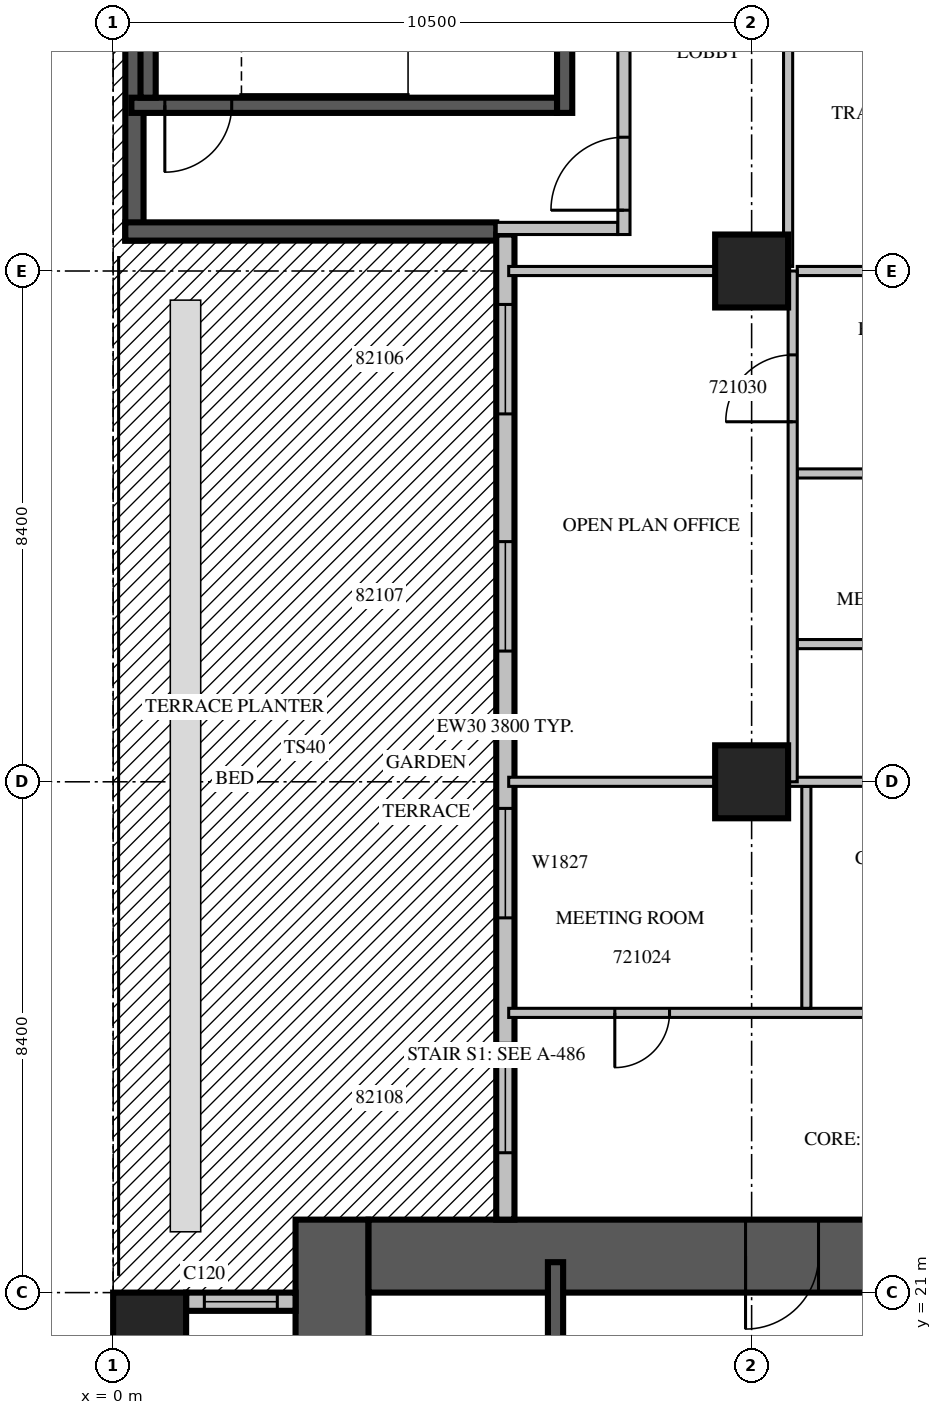
"""IFC4 building model, lengths in metres.
Left out: names, types, materials, properties, quantities, classifications, styles, units other than length and angle.
Written with IfcOpenShell. Run it as: python <this file> out.ifc"""

import sys

from ifc_helpers import new_model, si_unit, direction, frame, frame_2d, origin, origin_2d, place, context, subcontext, project, spatial, rectangle, extrude, source, transform, mapped, element, fill, save


model = new_model("IFC4")
c1 = context("Model", 3, precision=1e-05, world=origin(), true_north=direction((0.0, 1.0)))
c2 = subcontext(c1, "Body", "Model", "MODEL_VIEW")
j1 = project(units=[si_unit("LENGTHUNIT", "METRE"), si_unit("PLANEANGLEUNIT", "RADIAN")], contexts=[c1])
p1 = place(None, origin())
s1 = spatial("IfcSite", under=j1, at=p1, CompositionType="ELEMENT")
p2 = place(p1, origin())
s2 = spatial("IfcBuilding", under=s1, at=p2, CompositionType="ELEMENT")
p3 = place(p2, frame((0.0, 0.0, 99.3)))
s3 = spatial("IfcBuildingStorey", under=s2, at=p3, CompositionType="ELEMENT", Elevation=99.3)
m1 = source(origin(), c2, "Body", "SweptSolid", [
    extrude(rectangle(XDim=1.2, YDim=1.2, at=origin_2d()), origin(), (0.0, 0.0, 1.0), 4.2),
])
for number, where, z_axis, x_axis in (
    (1, (0.6, 20.4, 0.0), (0.0, 0.0, 1.0), (1.0, 0.0, 0.0)),
    (2, (10.5, 29.4, 0.0), (0.0, 0.0, 1.0), (1.0, 0.0, 0.0)),
    (3, (10.5, 37.8, 0.0), (0.0, 0.0, 1.0), (1.0, 0.0, 0.0)),
):
    element("IfcColumn", number, at=place(p3, frame(where, z_axis=z_axis, x_axis=x_axis)), inside=s3, PredefinedType="COLUMN", context=c2, shape_type="MappedRepresentation", body=[
        mapped(m1, transform((0.0, 0.0, 0.0), scale=1.0)),
    ])
m2 = source(origin(), c2, "Body", "SweptSolid", [
    extrude(rectangle(XDim=18.0, YDim=1.2, at=frame_2d((9.0, 0.0))), origin(), (0.0, 0.0, 1.0), 4.2),
])
p4 = place(p3, frame((3.6, 4.2, 0.0), z_axis=(0.0, 0.0, 1.0), x_axis=(0.0, 1.0, 0.0)))
e4 = element("IfcWall", 4, at=p4, inside=s3, PredefinedType="SHEAR", context=c2, shape_type="MappedRepresentation", body=[
    mapped(m2, transform((0.0, 0.0, 0.0), scale=1.0)),
])
m3 = source(origin(), c2, "Body", "SweptSolid", [
    extrude(rectangle(XDim=2.2, YDim=2.1, at=frame_2d((1.1, 1.05))), frame((0.0, 0.61, 0.0), z_axis=(0.0, -1.0, 0.0), x_axis=(1.0, 0.0, 0.0)), (0.0, 0.0, 1.0), 1.22),
])
p5 = place(p4, frame((4.2, 0.0, 0.0)))
e5 = element("IfcOpeningElement", 5, at=p5, cuts=e4, PredefinedType="OPENING", context=c2, shape_type="MappedRepresentation", body=[
    mapped(m3, transform((0.0, 0.0, 0.0), scale=1.0)),
])
p6 = place(p4, frame((10.95, 0.0, 0.0)))
e6 = element("IfcOpeningElement", 6, at=p6, cuts=e4, PredefinedType="OPENING", context=c2, shape_type="SweptSolid", body=[
    extrude(rectangle(XDim=0.9, YDim=2.1, at=frame_2d((0.45, 1.05))), frame((0.0, 0.61, 0.0), z_axis=(0.0, -1.0, 0.0), x_axis=(1.0, 0.0, 0.0)), (0.0, 0.0, 1.0), 1.22),
])
m4 = source(origin(), c2, "Body", "SweptSolid", [
    extrude(rectangle(XDim=16.8, YDim=1.2, at=frame_2d((8.4, 0.0))), origin(), (0.0, 0.0, 1.0), 4.2),
])
p7 = place(p3, frame((4.2, 21.6, 0.0), z_axis=(0.0, 0.0, 1.0), x_axis=(1.0, 0.0, 0.0)))
e7 = element("IfcWall", 7, at=p7, inside=s3, PredefinedType="SHEAR", context=c2, shape_type="MappedRepresentation", body=[
    mapped(m4, transform((0.0, 0.0, 0.0), scale=1.0)),
])
m5 = source(origin(), c2, "Body", "SweptSolid", [
    extrude(rectangle(XDim=1.2, YDim=2.1, at=frame_2d((0.6, 1.05))), frame((0.0, 0.61, 0.0), z_axis=(0.0, -1.0, 0.0), x_axis=(1.0, 0.0, 0.0)), (0.0, 0.0, 1.0), 1.22),
])
p8 = place(p7, frame((6.2, 0.0, 0.0)))
e8 = element("IfcOpeningElement", 8, at=p8, cuts=e7, PredefinedType="OPENING", context=c2, shape_type="MappedRepresentation", body=[
    mapped(m5, transform((0.0, 0.0, 0.0), scale=1.0)),
])
p9 = place(p3, frame((0.35, 43.95, 0.0), z_axis=(0.0, 0.0, 1.0), x_axis=(0.0, -1.0, 0.0)))
e9 = element("IfcWall", 9, at=p9, inside=s3, PredefinedType="SOLIDWALL", context=c2, shape_type="SweptSolid", body=[
    extrude(rectangle(XDim=5.65, YDim=0.3, at=frame_2d((2.825, 0.0))), origin(), (0.0, 0.0, 1.0), 3.8),
])
m6 = source(origin(), c2, "Body", "SweptSolid", [
    extrude(rectangle(XDim=6.1, YDim=0.3, at=frame_2d((3.05, 0.0))), origin(), (0.0, 0.0, 1.0), 3.8),
])
p10 = place(p3, frame((0.2, 38.45, 0.0), z_axis=(0.0, 0.0, 1.0), x_axis=(1.0, 0.0, 0.0)))
e10 = element("IfcWall", 10, at=p10, inside=s3, PredefinedType="SOLIDWALL", context=c2, shape_type="MappedRepresentation", body=[
    mapped(m6, transform((0.0, 0.0, 0.0), scale=1.0)),
])
p11 = place(p3, frame((6.45, 38.4, 0.0), z_axis=(0.0, 0.0, 1.0), x_axis=(0.0, -1.0, 0.0)))
e11 = element("IfcWall", 11, at=p11, inside=s3, PredefinedType="STANDARD", context=c2, shape_type="SweptSolid", body=[
    extrude(rectangle(XDim=16.2, YDim=0.3, at=frame_2d((8.1, 0.0))), origin(), (0.0, 0.0, 1.0), 3.8),
])
m7 = source(origin(), c2, "Body", "SweptSolid", [
    extrude(rectangle(XDim=1.8, YDim=2.4, at=frame_2d((0.9, 1.2))), frame((0.0, 0.16, 0.0), z_axis=(0.0, -1.0, 0.0), x_axis=(1.0, 0.0, 0.0)), (0.0, 0.0, 1.0), 0.32),
])
p12 = place(p11, frame((1.15, 0.0, 0.0)))
e12 = element("IfcOpeningElement", 12, at=p12, cuts=e11, PredefinedType="OPENING", context=c2, shape_type="MappedRepresentation", body=[
    mapped(m7, transform((0.0, 0.0, 0.0), scale=1.0)),
])
p13 = place(p11, frame((5.05, 0.0, 0.0)))
e13 = element("IfcOpeningElement", 13, at=p13, cuts=e11, PredefinedType="OPENING", context=c2, shape_type="MappedRepresentation", body=[
    mapped(m7, transform((0.0, 0.0, 0.0), scale=1.0)),
])
m8 = source(origin(), c2, "Body", "SweptSolid", [
    extrude(rectangle(XDim=1.8, YDim=2.7, at=frame_2d((0.9, 1.35))), frame((0.0, 0.16, 0.0), z_axis=(0.0, -1.0, 0.0), x_axis=(1.0, 0.0, 0.0)), (0.0, 0.0, 1.0), 0.32),
])
p14 = place(p11, frame((9.438, 0.0, 0.6)))
e14 = element("IfcOpeningElement", 14, at=p14, cuts=e11, PredefinedType="OPENING", context=c2, shape_type="MappedRepresentation", body=[
    mapped(m8, transform((0.0, 0.0, 0.0), scale=1.0)),
])
p15 = place(p11, frame((13.3, 0.0, 0.0)))
e15 = element("IfcOpeningElement", 15, at=p15, cuts=e11, PredefinedType="OPENING", context=c2, shape_type="MappedRepresentation", body=[
    mapped(m7, transform((0.0, 0.0, 0.0), scale=1.0)),
])
m9 = source(origin(), c2, "Body", "SweptSolid", [
    extrude(rectangle(XDim=1.8, YDim=0.3, at=frame_2d((0.9, 0.0))), origin(), (0.0, 0.0, 1.0), 3.8),
])
p16 = place(p3, frame((3.0, 20.85, 0.0), z_axis=(0.0, 0.0, 1.0), x_axis=(-1.0, 0.0, 0.0)))
e16 = element("IfcWall", 16, at=p16, inside=s3, PredefinedType="STANDARD", context=c2, shape_type="MappedRepresentation", body=[
    mapped(m9, transform((0.0, 0.0, 0.0), scale=1.0)),
])
m10 = source(origin(), c2, "Body", "SweptSolid", [
    extrude(rectangle(XDim=1.2, YDim=2.7, at=frame_2d((0.6, 1.35))), frame((0.0, 0.16, 0.0), z_axis=(0.0, -1.0, 0.0), x_axis=(1.0, 0.0, 0.0)), (0.0, 0.0, 1.0), 0.32),
])
p17 = place(p16, frame((0.3, 0.0, 0.6)))
e17 = element("IfcOpeningElement", 17, at=p17, cuts=e16, PredefinedType="OPENING", context=c2, shape_type="MappedRepresentation", body=[
    mapped(m10, transform((0.0, 0.0, 0.0), scale=1.0)),
])
m11 = source(origin(), c2, "Body", "SweptSolid", [
    extrude(rectangle(XDim=6.6, YDim=0.25, at=frame_2d((3.3, 0.0))), origin(), (0.0, 0.0, 1.0), 3.8),
])
p18 = place(p3, frame((7.275, 14.9, 0.0), z_axis=(0.0, 0.0, 1.0), x_axis=(0.0, 1.0, 0.0)))
e18 = element("IfcWall", 18, at=p18, inside=s3, PredefinedType="SOLIDWALL", context=c2, shape_type="MappedRepresentation", body=[
    mapped(m11, transform((0.0, 0.0, 0.0), scale=1.0)),
])
m12 = source(origin(), c2, "Body", "SweptSolid", [
    extrude(rectangle(XDim=1.1, YDim=2.1, at=frame_2d((0.55, 1.05))), frame((0.0, 0.135, 0.0), z_axis=(0.0, -1.0, 0.0), x_axis=(1.0, 0.0, 0.0)), (0.0, 0.0, 1.0), 0.27),
])
p19 = place(p18, frame((0.15, 0.0, 0.0)))
e19 = element("IfcOpeningElement", 19, at=p19, cuts=e18, PredefinedType="OPENING", context=c2, shape_type="MappedRepresentation", body=[
    mapped(m12, transform((0.0, 0.0, 0.0), scale=1.0)),
])
m13 = source(origin(), c2, "Body", "SweptSolid", [
    extrude(rectangle(XDim=7.0, YDim=0.25, at=frame_2d((3.5, 0.0))), origin(), (0.0, 0.0, 1.0), 3.8),
])
p20 = place(p3, frame((0.3, 40.525, 0.0), z_axis=(0.0, 0.0, 1.0), x_axis=(1.0, 0.0, 0.0)))
e20 = element("IfcWall", 20, at=p20, inside=s3, PredefinedType="SOLIDWALL", context=c2, shape_type="MappedRepresentation", body=[
    mapped(m13, transform((0.0, 0.0, 0.0), scale=1.0)),
])
p21 = place(p20, frame((0.55, 0.0, 0.0)))
e21 = element("IfcOpeningElement", 21, at=p21, cuts=e20, PredefinedType="OPENING", context=c2, shape_type="MappedRepresentation", body=[
    mapped(m12, transform((0.0, 0.0, 0.0), scale=1.0)),
])
m14 = source(origin(), c2, "Body", "SweptSolid", [
    extrude(rectangle(XDim=3.45, YDim=0.25, at=frame_2d((1.725, 0.0))), origin(), (0.0, 0.0, 1.0), 3.8),
])
p22 = place(p3, frame((7.425, 40.4, 0.0), z_axis=(0.0, 0.0, 1.0), x_axis=(0.0, 1.0, 0.0)))
e22 = element("IfcWall", 22, at=p22, inside=s3, PredefinedType="SOLIDWALL", context=c2, shape_type="MappedRepresentation", body=[
    mapped(m14, transform((0.0, 0.0, 0.0), scale=1.0)),
])
m15 = source(origin(), c2, "Body", "SweptSolid", [
    extrude(rectangle(XDim=2.95, YDim=0.25, at=frame_2d((1.475, 0.0))), origin(), (0.0, 0.0, 1.0), 3.8),
])
p23 = place(p3, frame((0.575, 40.65, 0.0), z_axis=(0.0, 0.0, 1.0), x_axis=(0.0, 1.0, 0.0)))
e23 = element("IfcWall", 23, at=p23, inside=s3, PredefinedType="SOLIDWALL", context=c2, shape_type="MappedRepresentation", body=[
    mapped(m15, transform((0.0, 0.0, 0.0), scale=1.0)),
])
p24 = place(p3, frame((6.3, 38.5, 0.0), z_axis=(0.0, 0.0, 1.0), x_axis=(1.0, 0.0, 0.0)))
e24 = element("IfcWall", 24, at=p24, inside=s3, PredefinedType="PARTITIONING", context=c2, shape_type="SweptSolid", body=[
    extrude(rectangle(XDim=2.0, YDim=0.2, at=frame_2d((1.0, 0.0))), origin(), (0.0, 0.0, 1.0), 3.8),
])
m16 = source(origin(), c2, "Body", "SweptSolid", [
    extrude(rectangle(XDim=5.45, YDim=0.2, at=frame_2d((2.725, 0.0))), origin(), (0.0, 0.0, 1.0), 3.8),
])
p25 = place(p3, frame((8.4, 38.4, 0.0), z_axis=(0.0, 0.0, 1.0), x_axis=(0.0, 1.0, 0.0)))
e25 = element("IfcWall", 25, at=p25, inside=s3, PredefinedType="PARTITIONING", context=c2, shape_type="MappedRepresentation", body=[
    mapped(m16, transform((0.0, 0.0, 0.0), scale=1.0)),
])
m17 = source(origin(), c2, "Body", "SweptSolid", [
    extrude(rectangle(XDim=1.2, YDim=2.1, at=frame_2d((0.6, 1.05))), frame((0.0, 0.11, 0.0), z_axis=(0.0, -1.0, 0.0), x_axis=(1.0, 0.0, 0.0)), (0.0, 0.0, 1.0), 0.22),
])
p26 = place(p25, frame((0.4, 0.0, 0.0)))
e26 = element("IfcOpeningElement", 26, at=p26, cuts=e25, PredefinedType="OPENING", context=c2, shape_type="MappedRepresentation", body=[
    mapped(m17, transform((0.0, 0.0, 0.0), scale=1.0)),
])
m18 = source(origin(), c2, "Body", "SweptSolid", [
    extrude(rectangle(XDim=0.9, YDim=2.1, at=frame_2d((0.45, 1.05))), frame((0.0, 0.11, 0.0), z_axis=(0.0, -1.0, 0.0), x_axis=(1.0, 0.0, 0.0)), (0.0, 0.0, 1.0), 0.22),
])
p27 = place(p25, frame((3.25, 0.0, 0.0)))
e27 = element("IfcOpeningElement", 27, at=p27, cuts=e25, PredefinedType="OPENING", context=c2, shape_type="MappedRepresentation", body=[
    mapped(m18, transform((0.0, 0.0, 0.0), scale=1.0)),
])
p28 = place(p3, frame((6.505, 25.6, 0.0), z_axis=(0.0, 0.0, 1.0), x_axis=(1.0, 0.0, 0.0)))
e28 = element("IfcWall", 28, at=p28, inside=s3, PredefinedType="PARTITIONING", context=c2, shape_type="SweptSolid", body=[
    extrude(rectangle(XDim=8.495, YDim=0.15, at=frame_2d((4.247, 0.0))), origin(), (0.0, 0.0, 1.0), 3.8),
])
m19 = source(origin(), c2, "Body", "SweptSolid", [
    extrude(rectangle(XDim=0.9, YDim=2.1, at=frame_2d((0.45, 1.05))), frame((0.0, 0.085, 0.0), z_axis=(0.0, -1.0, 0.0), x_axis=(1.0, 0.0, 0.0)), (0.0, 0.0, 1.0), 0.17),
])
p29 = place(p28, frame((1.745, 0.0, 0.0)))
e29 = element("IfcOpeningElement", 29, at=p29, cuts=e28, PredefinedType="OPENING", context=c2, shape_type="MappedRepresentation", body=[
    mapped(m19, transform((0.0, 0.0, 0.0), scale=1.0)),
])
p30 = place(p28, frame((6.82, 0.0, 0.0)))
e30 = element("IfcOpeningElement", 30, at=p30, cuts=e28, PredefinedType="OPENING", context=c2, shape_type="MappedRepresentation", body=[
    mapped(m19, transform((0.0, 0.0, 0.0), scale=1.0)),
])
m20 = source(origin(), c2, "Body", "SweptSolid", [
    extrude(rectangle(XDim=3.65, YDim=0.15, at=frame_2d((1.825, 0.0))), origin(), (0.0, 0.0, 1.0), 3.8),
])
p31 = place(p3, frame((11.4, 25.675, 0.0), z_axis=(0.0, 0.0, 1.0), x_axis=(0.0, 1.0, 0.0)))
e31 = element("IfcWall", 31, at=p31, inside=s3, PredefinedType="PARTITIONING", context=c2, shape_type="MappedRepresentation", body=[
    mapped(m20, transform((0.0, 0.0, 0.0), scale=1.0)),
])
p32 = place(p3, frame((9.901, 29.4, 0.0), z_axis=(0.0, 0.0, 1.0), x_axis=(-1.0, 0.0, 0.0)))
e32 = element("IfcWall", 32, at=p32, inside=s3, PredefinedType="PARTITIONING", context=c2, shape_type="SweptSolid", body=[
    extrude(rectangle(XDim=3.396, YDim=0.15, at=frame_2d((1.698, 0.0))), origin(), (0.0, 0.0, 1.0), 3.8),
])
m21 = source(origin(), c2, "Body", "SweptSolid", [
    extrude(rectangle(XDim=3.901, YDim=0.15, at=frame_2d((1.95, 0.0))), origin(), (0.0, 0.0, 1.0), 3.8),
])
p33 = place(p3, frame((15.0, 29.4, 0.0), z_axis=(0.0, 0.0, 1.0), x_axis=(-1.0, 0.0, 0.0)))
e33 = element("IfcWall", 33, at=p33, inside=s3, PredefinedType="PARTITIONING", context=c2, shape_type="MappedRepresentation", body=[
    mapped(m21, transform((0.0, 0.0, 0.0), scale=1.0)),
])
m22 = source(origin(), c2, "Body", "SweptSolid", [
    extrude(rectangle(XDim=6.45, YDim=0.15, at=frame_2d((3.225, 0.0))), origin(), (0.0, 0.0, 1.0), 3.8),
])
p34 = place(p3, frame((11.1, 44.325, 0.0), z_axis=(0.0, 0.0, 1.0), x_axis=(0.0, -1.0, 0.0)))
e34 = element("IfcWall", 34, at=p34, inside=s3, PredefinedType="PARTITIONING", context=c2, shape_type="MappedRepresentation", body=[
    mapped(m22, transform((0.0, 0.0, 0.0), scale=1.0)),
])
m23 = source(origin(), c2, "Body", "SweptSolid", [
    extrude(rectangle(XDim=3.75, YDim=0.15, at=frame_2d((1.875, 0.0))), origin(), (0.0, 0.0, 1.0), 3.8),
])
for number, where, z_axis, x_axis in (
    (35, (15.0, 31.665, 0.0), (0.0, 0.0, 1.0), (-1.0, 0.0, 0.0)),
    (36, (15.0, 34.471, 0.0), (0.0, 0.0, 1.0), (-1.0, 0.0, 0.0)),
):
    element("IfcWall", number, at=place(p3, frame(where, z_axis=z_axis, x_axis=x_axis)), inside=s3, PredefinedType="PARTITIONING", context=c2, shape_type="MappedRepresentation", body=[
        mapped(m23, transform((0.0, 0.0, 0.0), scale=1.0)),
    ])
m24 = source(origin(), c2, "Body", "SweptSolid", [
    extrude(rectangle(XDim=3.396, YDim=0.15, at=frame_2d((1.698, 0.0))), origin(), (0.0, 0.0, 1.0), 3.8),
])
p35 = place(p3, frame((9.901, 37.8, 0.0), z_axis=(0.0, 0.0, 1.0), x_axis=(-1.0, 0.0, 0.0)))
e37 = element("IfcWall", 37, at=p35, inside=s3, PredefinedType="PARTITIONING", context=c2, shape_type="MappedRepresentation", body=[
    mapped(m24, transform((0.0, 0.0, 0.0), scale=1.0)),
])
p36 = place(p3, frame((15.0, 37.8, 0.0), z_axis=(0.0, 0.0, 1.0), x_axis=(-1.0, 0.0, 0.0)))
e38 = element("IfcWall", 38, at=p36, inside=s3, PredefinedType="PARTITIONING", context=c2, shape_type="MappedRepresentation", body=[
    mapped(m23, transform((0.0, 0.0, 0.0), scale=1.0)),
])
m25 = source(origin(), c2, "Body", "SweptSolid", [
    extrude(rectangle(XDim=8.4, YDim=0.15, at=frame_2d((4.2, 0.0))), origin(), (0.0, 0.0, 1.0), 3.8),
])
p37 = place(p3, frame((11.175, 29.4, 0.0), z_axis=(0.0, 0.0, 1.0), x_axis=(0.0, 1.0, 0.0)))
e39 = element("IfcWall", 39, at=p37, inside=s3, PredefinedType="PARTITIONING", context=c2, shape_type="MappedRepresentation", body=[
    mapped(m25, transform((0.0, 0.0, 0.0), scale=1.0)),
])
m26 = source(origin(), c2, "Body", "SweptSolid", [
    extrude(rectangle(XDim=1.1, YDim=2.1, at=frame_2d((0.55, 1.05))), frame((0.0, 0.085, 0.0), z_axis=(0.0, -1.0, 0.0), x_axis=(1.0, 0.0, 0.0)), (0.0, 0.0, 1.0), 0.17),
])
p38 = place(p37, frame((5.921, 0.0, 0.0)))
e40 = element("IfcOpeningElement", 40, at=p38, cuts=e39, PredefinedType="OPENING", context=c2, shape_type="MappedRepresentation", body=[
    mapped(m26, transform((0.0, 0.0, 0.0), scale=1.0)),
])
m27 = source(origin(), c2, "Body", "SweptSolid", [
    extrude(rectangle(XDim=1.8, YDim=2.4, at=frame_2d((0.9, 1.2))), frame((0.0, 0.025, 0.0), z_axis=(0.0, -1.0, 0.0), x_axis=(1.0, 0.0, 0.0)), (0.0, 0.0, 1.0), 0.05),
])
p39 = place(p12, origin())
e41 = element("IfcDoor", 41, at=p39, inside=s3, OperationType="SLIDING_TO_LEFT", PredefinedType="DOOR", context=c2, shape_type="MappedRepresentation", body=[
    mapped(m27, transform((0.0, 0.0, 0.0), scale=1.0)),
])
fill(e12, e41)
p40 = place(p13, origin())
e42 = element("IfcDoor", 42, at=p40, inside=s3, OperationType="SLIDING_TO_LEFT", PredefinedType="DOOR", context=c2, shape_type="MappedRepresentation", body=[
    mapped(m27, transform((0.0, 0.0, 0.0), scale=1.0)),
])
fill(e13, e42)
m28 = source(origin(), c2, "Body", "SweptSolid", [
    extrude(rectangle(XDim=1.8, YDim=2.7, at=frame_2d((0.9, 1.35))), frame((0.0, 0.03, 0.0), z_axis=(0.0, -1.0, 0.0), x_axis=(1.0, 0.0, 0.0)), (0.0, 0.0, 1.0), 0.06),
])
p41 = place(p14, origin())
e43 = element("IfcWindow", 43, at=p41, inside=s3, PartitioningType="SINGLE_PANEL", PredefinedType="WINDOW", context=c2, shape_type="MappedRepresentation", body=[
    mapped(m28, transform((0.0, 0.0, 0.0), scale=1.0)),
])
fill(e14, e43)
p42 = place(p15, origin())
e44 = element("IfcDoor", 44, at=p42, inside=s3, OperationType="SLIDING_TO_LEFT", PredefinedType="DOOR", context=c2, shape_type="MappedRepresentation", body=[
    mapped(m27, transform((0.0, 0.0, 0.0), scale=1.0)),
])
fill(e15, e44)
m29 = source(origin(), c2, "Body", "SweptSolid", [
    extrude(rectangle(XDim=1.2, YDim=2.7, at=frame_2d((0.6, 1.35))), frame((0.0, 0.03, 0.0), z_axis=(0.0, -1.0, 0.0), x_axis=(1.0, 0.0, 0.0)), (0.0, 0.0, 1.0), 0.06),
])
p43 = place(p17, origin())
e45 = element("IfcWindow", 45, at=p43, inside=s3, PartitioningType="SINGLE_PANEL", PredefinedType="WINDOW", context=c2, shape_type="MappedRepresentation", body=[
    mapped(m29, transform((0.0, 0.0, 0.0), scale=1.0)),
])
fill(e17, e45)
m30 = source(origin(), c2, "Body", "SweptSolid", [
    extrude(rectangle(XDim=1.1, YDim=2.1, at=frame_2d((0.55, 1.05))), frame((0.0, 0.025, 0.0), z_axis=(0.0, -1.0, 0.0), x_axis=(1.0, 0.0, 0.0)), (0.0, 0.0, 1.0), 0.05),
])
p44 = place(p21, origin())
e46 = element("IfcDoor", 46, at=p44, inside=s3, OperationType="SINGLE_SWING_RIGHT", PredefinedType="DOOR", context=c2, shape_type="MappedRepresentation", body=[
    mapped(m30, transform((0.0, 0.0, 0.0), scale=1.0)),
])
fill(e21, e46)
m31 = source(origin(), c2, "Body", "SweptSolid", [
    extrude(rectangle(XDim=1.2, YDim=2.1, at=frame_2d((0.6, 1.05))), frame((0.0, 0.025, 0.0), z_axis=(0.0, -1.0, 0.0), x_axis=(1.0, 0.0, 0.0)), (0.0, 0.0, 1.0), 0.05),
])
p45 = place(p26, origin())
e47 = element("IfcDoor", 47, at=p45, inside=s3, OperationType="SINGLE_SWING_LEFT", PredefinedType="DOOR", context=c2, shape_type="MappedRepresentation", body=[
    mapped(m31, transform((0.0, 0.0, 0.0), scale=1.0)),
])
fill(e26, e47)
p46 = place(p8, origin())
e48 = element("IfcDoor", 48, at=p46, inside=s3, OperationType="SINGLE_SWING_RIGHT", PredefinedType="DOOR", context=c2, shape_type="MappedRepresentation", body=[
    mapped(m31, transform((0.0, 0.0, 0.0), scale=1.0)),
])
fill(e8, e48)
m32 = source(origin(), c2, "Body", "SweptSolid", [
    extrude(rectangle(XDim=0.9, YDim=2.1, at=frame_2d((0.45, 1.05))), frame((0.0, 0.025, 0.0), z_axis=(0.0, -1.0, 0.0), x_axis=(1.0, 0.0, 0.0)), (0.0, 0.0, 1.0), 0.05),
])
p47 = place(p29, origin())
e49 = element("IfcDoor", 49, at=p47, inside=s3, OperationType="SINGLE_SWING_RIGHT", PredefinedType="DOOR", context=c2, shape_type="MappedRepresentation", body=[
    mapped(m32, transform((0.0, 0.0, 0.0), scale=1.0)),
])
fill(e29, e49)
p48 = place(p38, origin())
e50 = element("IfcDoor", 50, at=p48, inside=s3, OperationType="SINGLE_SWING_LEFT", PredefinedType="DOOR", context=c2, shape_type="MappedRepresentation", body=[
    mapped(m30, transform((0.0, 0.0, 0.0), scale=1.0)),
])
fill(e40, e50)
save(model, sys.argv[1])
